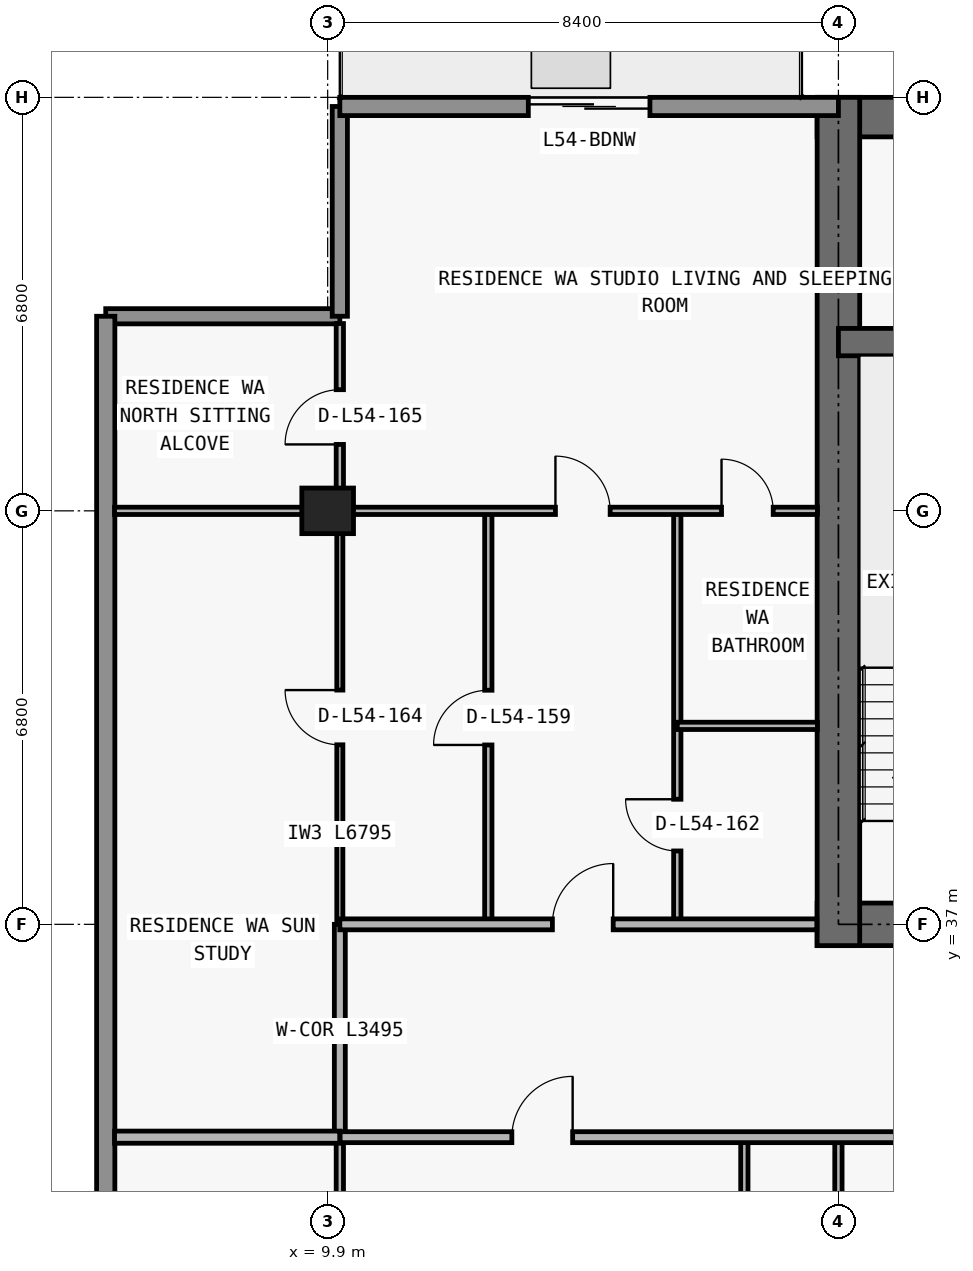
"""IFC4 building model, lengths in metres.
Left out: names, types, materials, properties, quantities, classifications, styles, units other than length and angle.
Written with IfcOpenShell. Run it as: python <this file> out.ifc"""

import sys

from ifc_helpers import new_model, si_unit, direction, frame, frame_2d, origin, origin_2d, place, context, subcontext, project, spatial, rectangle, extrude, element, fill, save


model = new_model("IFC4")
c1 = context("Model", 3, precision=1e-05, world=origin(), true_north=direction((0.0, 1.0)))
c2 = subcontext(c1, "Body", "Model", "MODEL_VIEW")
j1 = project(units=[si_unit("LENGTHUNIT", "METRE"), si_unit("PLANEANGLEUNIT", "RADIAN")], contexts=[c1])
p1 = place(None, origin())
s1 = spatial("IfcSite", under=j1, at=p1, CompositionType="ELEMENT")
p2 = place(p1, origin())
s2 = spatial("IfcBuilding", under=s1, at=p2, CompositionType="ELEMENT")
p3 = place(p2, frame((0.0, 0.0, 195.0)))
s3 = spatial("IfcBuildingStorey", under=s2, at=p3, CompositionType="ELEMENT", Elevation=195.0)
p4 = place(p3, frame((9.9, 43.8, 0.0), z_axis=(0.0, 0.0, 1.0), x_axis=(1.0, 0.0, 0.0)))
e1 = element("IfcColumn", 1, at=p4, inside=s3, PredefinedType="COLUMN", context=c2, shape_type="SweptSolid", body=[
    extrude(rectangle(XDim=0.85, YDim=0.75, at=origin_2d()), origin(), (0.0, 0.0, 1.0), 3.05),
])
p5 = place(p3, frame((17.95, 37.0, 0.0), z_axis=(0.0, 0.0, 1.0), x_axis=(1.0, 0.0, 0.0)))
e2 = element("IfcWall", 2, at=p5, inside=s3, PredefinedType="SHEAR", context=c2, shape_type="SweptSolid", body=[
    extrude(rectangle(XDim=41.9, YDim=0.7, at=frame_2d((20.95, 0.0))), origin(), (0.0, 0.0, 1.0), 3.05),
])
p6 = place(p5, frame((14.35, 0.0, 0.0)))
e3 = element("IfcOpeningElement", 3, at=p6, cuts=e2, PredefinedType="OPENING", context=c2, shape_type="SweptSolid", body=[
    extrude(rectangle(XDim=1.1, YDim=2.15, at=frame_2d((0.55, 1.075))), frame((0.0, 0.36, 0.0), z_axis=(0.0, -1.0, 0.0), x_axis=(1.0, 0.0, 0.0)), (0.0, 0.0, 1.0), 0.72),
])
p7 = place(p5, frame((6.2, 0.0, 0.0)))
e4 = element("IfcOpeningElement", 4, at=p7, cuts=e2, PredefinedType="OPENING", context=c2, shape_type="SweptSolid", body=[
    extrude(rectangle(XDim=1.05, YDim=2.15, at=frame_2d((0.525, 1.075))), frame((0.0, 0.36, 0.0), z_axis=(0.0, -1.0, 0.0), x_axis=(1.0, 0.0, 0.0)), (0.0, 0.0, 1.0), 0.72),
])
p8 = place(p5, frame((34.7, 0.0, 0.0)))
e5 = element("IfcOpeningElement", 5, at=p8, cuts=e2, PredefinedType="OPENING", context=c2, shape_type="SweptSolid", body=[
    extrude(rectangle(XDim=1.05, YDim=2.15, at=frame_2d((0.525, 1.075))), frame((0.0, 0.36, 0.0), z_axis=(0.0, -1.0, 0.0), x_axis=(1.0, 0.0, 0.0)), (0.0, 0.0, 1.0), 0.72),
])
p9 = place(p5, frame((10.812, 0.0, 0.0)))
e6 = element("IfcOpeningElement", 6, at=p9, cuts=e2, PredefinedType="OPENING", context=c2, shape_type="SweptSolid", body=[
    extrude(rectangle(XDim=1.05, YDim=2.15, at=frame_2d((0.525, 1.075))), frame((0.0, 0.36, 0.0), z_axis=(0.0, -1.0, 0.0), x_axis=(1.0, 0.0, 0.0)), (0.0, 0.0, 1.0), 0.72),
])
p10 = place(p5, frame((24.05, 0.0, 0.0)))
e7 = element("IfcOpeningElement", 7, at=p10, cuts=e2, PredefinedType="OPENING", context=c2, shape_type="SweptSolid", body=[
    extrude(rectangle(XDim=1.05, YDim=2.15, at=frame_2d((0.525, 1.075))), frame((0.0, 0.36, 0.0), z_axis=(0.0, -1.0, 0.0), x_axis=(1.0, 0.0, 0.0)), (0.0, 0.0, 1.0), 0.72),
])
p11 = place(p3, frame((17.95, 50.275, 0.0), z_axis=(0.0, 0.0, 1.0), x_axis=(1.0, 0.0, 0.0)))
e8 = element("IfcWall", 8, at=p11, inside=s3, PredefinedType="SHEAR", context=c2, shape_type="SweptSolid", body=[
    extrude(rectangle(XDim=41.9, YDim=0.65, at=frame_2d((20.95, 0.0))), origin(), (0.0, 0.0, 1.0), 3.05),
])
p12 = place(p3, frame((18.3, 36.65, 0.0), z_axis=(0.0, 0.0, 1.0), x_axis=(0.0, 1.0, 0.0)))
e9 = element("IfcWall", 9, at=p12, inside=s3, PredefinedType="SHEAR", context=c2, shape_type="SweptSolid", body=[
    extrude(rectangle(XDim=13.95, YDim=0.7, at=frame_2d((6.975, 0.0))), origin(), (0.0, 0.0, 1.0), 3.05),
])
p13 = place(p3, frame((18.3, 46.575, 0.0), z_axis=(0.0, 0.0, 1.0), x_axis=(1.0, 0.0, 0.0)))
e10 = element("IfcWall", 10, at=p13, inside=s3, PredefinedType="SHEAR", context=c2, shape_type="SweptSolid", body=[
    extrude(rectangle(XDim=41.2, YDim=0.45, at=frame_2d((20.6, 0.0))), origin(), (0.0, 0.0, 1.0), 3.05),
])
p14 = place(p13, frame((7.575, 0.0, 0.0)))
e11 = element("IfcOpeningElement", 11, at=p14, cuts=e10, PredefinedType="OPENING", context=c2, shape_type="SweptSolid", body=[
    extrude(rectangle(XDim=1.05, YDim=2.15, at=frame_2d((0.525, 1.075))), frame((0.0, 0.235, 0.0), z_axis=(0.0, -1.0, 0.0), x_axis=(1.0, 0.0, 0.0)), (0.0, 0.0, 1.0), 0.47),
])
p15 = place(p13, frame((32.625, 0.0, 0.0)))
e12 = element("IfcOpeningElement", 12, at=p15, cuts=e10, PredefinedType="OPENING", context=c2, shape_type="SweptSolid", body=[
    extrude(rectangle(XDim=1.05, YDim=2.15, at=frame_2d((0.525, 1.075))), frame((0.0, 0.235, 0.0), z_axis=(0.0, -1.0, 0.0), x_axis=(1.0, 0.0, 0.0)), (0.0, 0.0, 1.0), 0.47),
])
p16 = place(p3, frame((6.25, 47.0, 0.0), z_axis=(0.0, 0.0, 1.0), x_axis=(1.0, 0.0, 0.0)))
e13 = element("IfcWall", 13, at=p16, inside=s3, PredefinedType="ELEMENTEDWALL", context=c2, shape_type="SweptSolid", body=[
    extrude(rectangle(XDim=3.85, YDim=0.25, at=frame_2d((1.925, 0.0))), origin(), (0.0, 0.0, 1.0), 3.05),
])
p17 = place(p3, frame((10.1, 47.0, 0.0), z_axis=(0.0, 0.0, 1.0), x_axis=(0.0, 1.0, 0.0)))
e14 = element("IfcWall", 14, at=p17, inside=s3, PredefinedType="ELEMENTEDWALL", context=c2, shape_type="SweptSolid", body=[
    extrude(rectangle(XDim=3.45, YDim=0.25, at=frame_2d((1.725, 0.0))), origin(), (0.0, 0.0, 1.0), 3.05),
])
p18 = place(p3, frame((6.25, 29.1, 0.0), z_axis=(0.0, 0.0, 1.0), x_axis=(0.0, 1.0, 0.0)))
e15 = element("IfcWall", 15, at=p18, inside=s3, PredefinedType="STANDARD", context=c2, shape_type="SweptSolid", body=[
    extrude(rectangle(XDim=17.9, YDim=0.3, at=frame_2d((8.95, 0.0))), origin(), (0.0, 0.0, 1.0), 3.05),
])
p19 = place(p3, frame((10.1, 50.45, 0.0), z_axis=(0.0, 0.0, 1.0), x_axis=(1.0, 0.0, 0.0)))
e16 = element("IfcWall", 16, at=p19, inside=s3, PredefinedType="STANDARD", context=c2, shape_type="SweptSolid", body=[
    extrude(rectangle(XDim=8.2, YDim=0.3, at=frame_2d((4.1, 0.0))), origin(), (0.0, 0.0, 1.0), 3.05),
])
p20 = place(p19, frame((3.1, 0.0, 0.0)))
e17 = element("IfcOpeningElement", 17, at=p20, cuts=e16, PredefinedType="OPENING", context=c2, shape_type="SweptSolid", body=[
    extrude(rectangle(XDim=2.0, YDim=2.3, at=frame_2d((1.0, 1.15))), frame((0.0, 0.16, 0.0), z_axis=(0.0, -1.0, 0.0), x_axis=(1.0, 0.0, 0.0)), (0.0, 0.0, 1.0), 0.32),
])
p21 = place(p3, frame((10.1, 27.18, 0.0), z_axis=(0.0, 0.0, 1.0), x_axis=(0.0, 1.0, 0.0)))
e18 = element("IfcWall", 18, at=p21, inside=s3, PredefinedType="PARTITIONING", context=c2, shape_type="SweptSolid", body=[
    extrude(rectangle(XDim=6.32, YDim=0.12, at=frame_2d((3.16, 0.0))), origin(), (0.0, 0.0, 1.0), 2.263),
])
p22 = place(p3, frame((10.1, 33.505, 0.0), z_axis=(0.0, 0.0, 1.0), x_axis=(0.0, 1.0, 0.0)))
e19 = element("IfcWall", 19, at=p22, inside=s3, PredefinedType="PARTITIONING", context=c2, shape_type="SweptSolid", body=[
    extrude(rectangle(XDim=3.495, YDim=0.18, at=frame_2d((1.748, 0.0))), origin(), (0.0, 0.0, 1.0), 2.263),
])
p23 = place(p3, frame((10.1, 37.005, 0.0), z_axis=(0.0, 0.0, 1.0), x_axis=(0.0, 1.0, 0.0)))
e20 = element("IfcWall", 20, at=p23, inside=s3, PredefinedType="MOVABLE", context=c2, shape_type="SweptSolid", body=[
    extrude(rectangle(XDim=6.795, YDim=0.1, at=frame_2d((3.397, 0.0))), origin(), (0.0, 0.0, 1.0), 2.263),
])
p24 = place(p23, frame((2.948, 0.0, 0.0)))
e21 = element("IfcOpeningElement", 21, at=p24, cuts=e20, PredefinedType="OPENING", context=c2, shape_type="SweptSolid", body=[
    extrude(rectangle(XDim=0.9, YDim=2.15, at=frame_2d((0.45, 1.075))), frame((0.0, 0.06, 0.0), z_axis=(0.0, -1.0, 0.0), x_axis=(1.0, 0.0, 0.0)), (0.0, 0.0, 1.0), 0.12),
])
p25 = place(p3, frame((10.1, 43.805, 0.0), z_axis=(0.0, 0.0, 1.0), x_axis=(0.0, 1.0, 0.0)))
e22 = element("IfcWall", 22, at=p25, inside=s3, PredefinedType="PARTITIONING", context=c2, shape_type="SweptSolid", body=[
    extrude(rectangle(XDim=3.075, YDim=0.12, at=frame_2d((1.538, 0.0))), origin(), (0.0, 0.0, 1.0), 3.05),
])
p26 = place(p25, frame((1.087, 0.0, 0.0)))
e23 = element("IfcOpeningElement", 23, at=p26, cuts=e22, PredefinedType="OPENING", context=c2, shape_type="SweptSolid", body=[
    extrude(rectangle(XDim=0.9, YDim=2.15, at=frame_2d((0.45, 1.075))), frame((0.0, 0.07, 0.0), z_axis=(0.0, -1.0, 0.0), x_axis=(1.0, 0.0, 0.0)), (0.0, 0.0, 1.0), 0.14),
])
p27 = place(p3, frame((12.542, 37.0, 0.0), z_axis=(0.0, 0.0, 1.0), x_axis=(0.0, 1.0, 0.0)))
e24 = element("IfcWall", 24, at=p27, inside=s3, PredefinedType="PARTITIONING", context=c2, shape_type="SweptSolid", body=[
    extrude(rectangle(XDim=6.8, YDim=0.12, at=frame_2d((3.4, 0.0))), origin(), (0.0, 0.0, 1.0), 3.05),
])
p28 = place(p27, frame((2.95, 0.0, 0.0)))
e25 = element("IfcOpeningElement", 25, at=p28, cuts=e24, PredefinedType="OPENING", context=c2, shape_type="SweptSolid", body=[
    extrude(rectangle(XDim=0.9, YDim=2.15, at=frame_2d((0.45, 1.075))), frame((0.0, 0.07, 0.0), z_axis=(0.0, -1.0, 0.0), x_axis=(1.0, 0.0, 0.0)), (0.0, 0.0, 1.0), 0.14),
])
p29 = place(p3, frame((15.65, 37.0, 0.0), z_axis=(0.0, 0.0, 1.0), x_axis=(0.0, 1.0, 0.0)))
e26 = element("IfcWall", 26, at=p29, inside=s3, PredefinedType="PARTITIONING", context=c2, shape_type="SweptSolid", body=[
    extrude(rectangle(XDim=6.8, YDim=0.12, at=frame_2d((3.4, 0.0))), origin(), (0.0, 0.0, 1.0), 3.05),
])
p30 = place(p29, frame((1.207, 0.0, 0.0)))
e27 = element("IfcOpeningElement", 27, at=p30, cuts=e26, PredefinedType="OPENING", context=c2, shape_type="SweptSolid", body=[
    extrude(rectangle(XDim=0.85, YDim=2.1, at=frame_2d((0.425, 1.05))), frame((0.0, 0.07, 0.0), z_axis=(0.0, -1.0, 0.0), x_axis=(1.0, 0.0, 0.0)), (0.0, 0.0, 1.0), 0.14),
])
p31 = place(p3, frame((16.753, 27.18, 0.0), z_axis=(0.0, 0.0, 1.0), x_axis=(0.0, 1.0, 0.0)))
e28 = element("IfcWall", 28, at=p31, inside=s3, PredefinedType="PARTITIONING", context=c2, shape_type="SweptSolid", body=[
    extrude(rectangle(XDim=6.32, YDim=0.12, at=frame_2d((3.16, 0.0))), origin(), (0.0, 0.0, 1.0), 3.05),
])
p32 = place(p31, frame((3.035, 0.0, 0.0)))
e29 = element("IfcOpeningElement", 29, at=p32, cuts=e28, PredefinedType="OPENING", context=c2, shape_type="SweptSolid", body=[
    extrude(rectangle(XDim=0.85, YDim=2.1, at=frame_2d((0.425, 1.05))), frame((0.0, 0.07, 0.0), z_axis=(0.0, -1.0, 0.0), x_axis=(1.0, 0.0, 0.0)), (0.0, 0.0, 1.0), 0.14),
])
p33 = place(p3, frame((18.3, 27.18, 0.0), z_axis=(0.0, 0.0, 1.0), x_axis=(0.0, 1.0, 0.0)))
e30 = element("IfcWall", 30, at=p33, inside=s3, PredefinedType="PARTITIONING", context=c2, shape_type="SweptSolid", body=[
    extrude(rectangle(XDim=6.32, YDim=0.12, at=frame_2d((3.16, 0.0))), origin(), (0.0, 0.0, 1.0), 2.263),
])
p34 = place(p3, frame((6.395, 33.5, 0.0), z_axis=(0.0, 0.0, 1.0), x_axis=(1.0, 0.0, 0.0)))
e31 = element("IfcWall", 31, at=p34, inside=s3, PredefinedType="PARTITIONING", context=c2, shape_type="SweptSolid", body=[
    extrude(rectangle(XDim=3.705, YDim=0.2, at=frame_2d((1.853, 0.0))), origin(), (0.0, 0.0, 1.0), 3.05),
])
p35 = place(p3, frame((10.105, 33.5, 0.0), z_axis=(0.0, 0.0, 1.0), x_axis=(1.0, 0.0, 0.0)))
e32 = element("IfcWall", 32, at=p35, inside=s3, PredefinedType="PARTITIONING", context=c2, shape_type="SweptSolid", body=[
    extrude(rectangle(XDim=57.595, YDim=0.18, at=frame_2d((28.797, 0.0))), origin(), (0.0, 0.0, 1.0), 3.05),
])
p36 = place(p35, frame((2.824, 0.0, 0.0)))
e33 = element("IfcOpeningElement", 33, at=p36, cuts=e32, PredefinedType="OPENING", context=c2, shape_type="SweptSolid", body=[
    extrude(rectangle(XDim=1.0, YDim=2.2, at=frame_2d((0.5, 1.1))), frame((0.0, 0.1, 0.0), z_axis=(0.0, -1.0, 0.0), x_axis=(1.0, 0.0, 0.0)), (0.0, 0.0, 1.0), 0.2),
])
p37 = place(p35, frame((19.47, 0.0, 0.0)))
e34 = element("IfcOpeningElement", 34, at=p37, cuts=e32, PredefinedType="OPENING", context=c2, shape_type="SweptSolid", body=[
    extrude(rectangle(XDim=1.0, YDim=2.2, at=frame_2d((0.5, 1.1))), frame((0.0, 0.1, 0.0), z_axis=(0.0, -1.0, 0.0), x_axis=(1.0, 0.0, 0.0)), (0.0, 0.0, 1.0), 0.2),
])
p38 = place(p35, frame((27.527, 0.0, 0.0)))
e35 = element("IfcOpeningElement", 35, at=p38, cuts=e32, PredefinedType="OPENING", context=c2, shape_type="SweptSolid", body=[
    extrude(rectangle(XDim=1.0, YDim=2.2, at=frame_2d((0.5, 1.1))), frame((0.0, 0.1, 0.0), z_axis=(0.0, -1.0, 0.0), x_axis=(1.0, 0.0, 0.0)), (0.0, 0.0, 1.0), 0.2),
])
p39 = place(p35, frame((43.87, 0.0, 0.0)))
e36 = element("IfcOpeningElement", 36, at=p39, cuts=e32, PredefinedType="OPENING", context=c2, shape_type="SweptSolid", body=[
    extrude(rectangle(XDim=1.0, YDim=2.2, at=frame_2d((0.5, 1.1))), frame((0.0, 0.1, 0.0), z_axis=(0.0, -1.0, 0.0), x_axis=(1.0, 0.0, 0.0)), (0.0, 0.0, 1.0), 0.2),
])
p40 = place(p35, frame((52.17, 0.0, 0.0)))
e37 = element("IfcOpeningElement", 37, at=p40, cuts=e32, PredefinedType="OPENING", context=c2, shape_type="SweptSolid", body=[
    extrude(rectangle(XDim=1.0, YDim=2.2, at=frame_2d((0.5, 1.1))), frame((0.0, 0.1, 0.0), z_axis=(0.0, -1.0, 0.0), x_axis=(1.0, 0.0, 0.0)), (0.0, 0.0, 1.0), 0.2),
])
p41 = place(p3, frame((10.1, 37.0, 0.0), z_axis=(0.0, 0.0, 1.0), x_axis=(1.0, 0.0, 0.0)))
e38 = element("IfcWall", 38, at=p41, inside=s3, PredefinedType="PARTITIONING", context=c2, shape_type="SweptSolid", body=[
    extrude(rectangle(XDim=7.845, YDim=0.18, at=frame_2d((3.922, 0.0))), origin(), (0.0, 0.0, 1.0), 3.05),
])
p42 = place(p41, frame((3.496, 0.0, 0.0)))
e39 = element("IfcOpeningElement", 39, at=p42, cuts=e38, PredefinedType="OPENING", context=c2, shape_type="SweptSolid", body=[
    extrude(rectangle(XDim=1.0, YDim=2.2, at=frame_2d((0.5, 1.1))), frame((0.0, 0.1, 0.0), z_axis=(0.0, -1.0, 0.0), x_axis=(1.0, 0.0, 0.0)), (0.0, 0.0, 1.0), 0.2),
])
p43 = place(p3, frame((15.65, 40.264, 0.0), z_axis=(0.0, 0.0, 1.0), x_axis=(1.0, 0.0, 0.0)))
e40 = element("IfcWall", 40, at=p43, inside=s3, PredefinedType="PARTITIONING", context=c2, shape_type="SweptSolid", body=[
    extrude(rectangle(XDim=2.305, YDim=0.12, at=frame_2d((1.153, 0.0))), origin(), (0.0, 0.0, 1.0), 3.05),
])
p44 = place(p3, frame((6.395, 43.8, 0.0), z_axis=(0.0, 0.0, 1.0), x_axis=(1.0, 0.0, 0.0)))
e41 = element("IfcWall", 41, at=p44, inside=s3, PredefinedType="PARTITIONING", context=c2, shape_type="SweptSolid", body=[
    extrude(rectangle(XDim=11.56, YDim=0.12, at=frame_2d((5.78, 0.0))), origin(), (0.0, 0.0, 1.0), 2.418),
])
p45 = place(p44, frame((7.251, 0.0, 0.0)))
e42 = element("IfcOpeningElement", 42, at=p45, cuts=e41, PredefinedType="OPENING", context=c2, shape_type="SweptSolid", body=[
    extrude(rectangle(XDim=0.9, YDim=2.15, at=frame_2d((0.45, 1.075))), frame((0.0, 0.07, 0.0), z_axis=(0.0, -1.0, 0.0), x_axis=(1.0, 0.0, 0.0)), (0.0, 0.0, 1.0), 0.14),
])
p46 = place(p44, frame((9.982, 0.0, 0.0)))
e43 = element("IfcOpeningElement", 43, at=p46, cuts=e41, PredefinedType="OPENING", context=c2, shape_type="SweptSolid", body=[
    extrude(rectangle(XDim=0.85, YDim=2.1, at=frame_2d((0.425, 1.05))), frame((0.0, 0.07, 0.0), z_axis=(0.0, -1.0, 0.0), x_axis=(1.0, 0.0, 0.0)), (0.0, 0.0, 1.0), 0.14),
])
p47 = place(p20, origin())
e44 = element("IfcDoor", 44, at=p47, inside=s3, OperationType="DOUBLE_DOOR_SLIDING", PredefinedType="DOOR", context=c2, shape_type="SweptSolid", body=[
    extrude(rectangle(XDim=2.0, YDim=2.3, at=frame_2d((1.0, 1.15))), frame((0.0, 0.025, 0.0), z_axis=(0.0, -1.0, 0.0), x_axis=(1.0, 0.0, 0.0)), (0.0, 0.0, 1.0), 0.05),
])
fill(e17, e44)
p48 = place(p36, origin())
e45 = element("IfcDoor", 45, at=p48, inside=s3, OperationType="SINGLE_SWING_RIGHT", PredefinedType="DOOR", context=c2, shape_type="SweptSolid", body=[
    extrude(rectangle(XDim=1.0, YDim=2.2, at=frame_2d((0.5, 1.1))), frame((0.0, 0.025, 0.0), z_axis=(0.0, -1.0, 0.0), x_axis=(1.0, 0.0, 0.0)), (0.0, 0.0, 1.0), 0.05),
])
fill(e33, e45)
p49 = place(p28, origin())
e46 = element("IfcDoor", 46, at=p49, inside=s3, OperationType="SINGLE_SWING_LEFT", PredefinedType="DOOR", context=c2, shape_type="SweptSolid", body=[
    extrude(rectangle(XDim=0.9, YDim=2.15, at=frame_2d((0.45, 1.075))), frame((0.0, 0.025, 0.0), z_axis=(0.0, -1.0, 0.0), x_axis=(1.0, 0.0, 0.0)), (0.0, 0.0, 1.0), 0.05),
])
fill(e25, e46)
p50 = place(p42, origin())
e47 = element("IfcDoor", 47, at=p50, inside=s3, OperationType="SINGLE_SWING_RIGHT", PredefinedType="DOOR", context=c2, shape_type="SweptSolid", body=[
    extrude(rectangle(XDim=1.0, YDim=2.2, at=frame_2d((0.5, 1.1))), frame((0.0, 0.025, 0.0), z_axis=(0.0, -1.0, 0.0), x_axis=(1.0, 0.0, 0.0)), (0.0, 0.0, 1.0), 0.05),
])
fill(e39, e47)
p51 = place(p45, origin())
e48 = element("IfcDoor", 48, at=p51, inside=s3, OperationType="SINGLE_SWING_LEFT", PredefinedType="DOOR", context=c2, shape_type="SweptSolid", body=[
    extrude(rectangle(XDim=0.9, YDim=2.15, at=frame_2d((0.45, 1.075))), frame((0.0, 0.025, 0.0), z_axis=(0.0, -1.0, 0.0), x_axis=(1.0, 0.0, 0.0)), (0.0, 0.0, 1.0), 0.05),
])
fill(e42, e48)
p52 = place(p30, origin())
e49 = element("IfcDoor", 49, at=p52, inside=s3, OperationType="SINGLE_SWING_RIGHT", PredefinedType="DOOR", context=c2, shape_type="SweptSolid", body=[
    extrude(rectangle(XDim=0.85, YDim=2.1, at=frame_2d((0.425, 1.05))), frame((0.0, 0.025, 0.0), z_axis=(0.0, -1.0, 0.0), x_axis=(1.0, 0.0, 0.0)), (0.0, 0.0, 1.0), 0.05),
])
fill(e27, e49)
p53 = place(p46, origin())
e50 = element("IfcDoor", 50, at=p53, inside=s3, OperationType="SINGLE_SWING_LEFT", PredefinedType="DOOR", context=c2, shape_type="SweptSolid", body=[
    extrude(rectangle(XDim=0.85, YDim=2.1, at=frame_2d((0.425, 1.05))), frame((0.0, 0.025, 0.0), z_axis=(0.0, -1.0, 0.0), x_axis=(1.0, 0.0, 0.0)), (0.0, 0.0, 1.0), 0.05),
])
fill(e43, e50)
p54 = place(p24, origin())
e51 = element("IfcDoor", 51, at=p54, inside=s3, OperationType="SINGLE_SWING_RIGHT", PredefinedType="DOOR", context=c2, shape_type="SweptSolid", body=[
    extrude(rectangle(XDim=0.9, YDim=2.15, at=frame_2d((0.45, 1.075))), frame((0.0, 0.025, 0.0), z_axis=(0.0, -1.0, 0.0), x_axis=(1.0, 0.0, 0.0)), (0.0, 0.0, 1.0), 0.05),
])
fill(e21, e51)
p55 = place(p26, origin())
e52 = element("IfcDoor", 52, at=p55, inside=s3, OperationType="SINGLE_SWING_LEFT", PredefinedType="DOOR", context=c2, shape_type="SweptSolid", body=[
    extrude(rectangle(XDim=0.9, YDim=2.15, at=frame_2d((0.45, 1.075))), frame((0.0, 0.025, 0.0), z_axis=(0.0, -1.0, 0.0), x_axis=(1.0, 0.0, 0.0)), (0.0, 0.0, 1.0), 0.05),
])
fill(e23, e52)
save(model, sys.argv[1])
